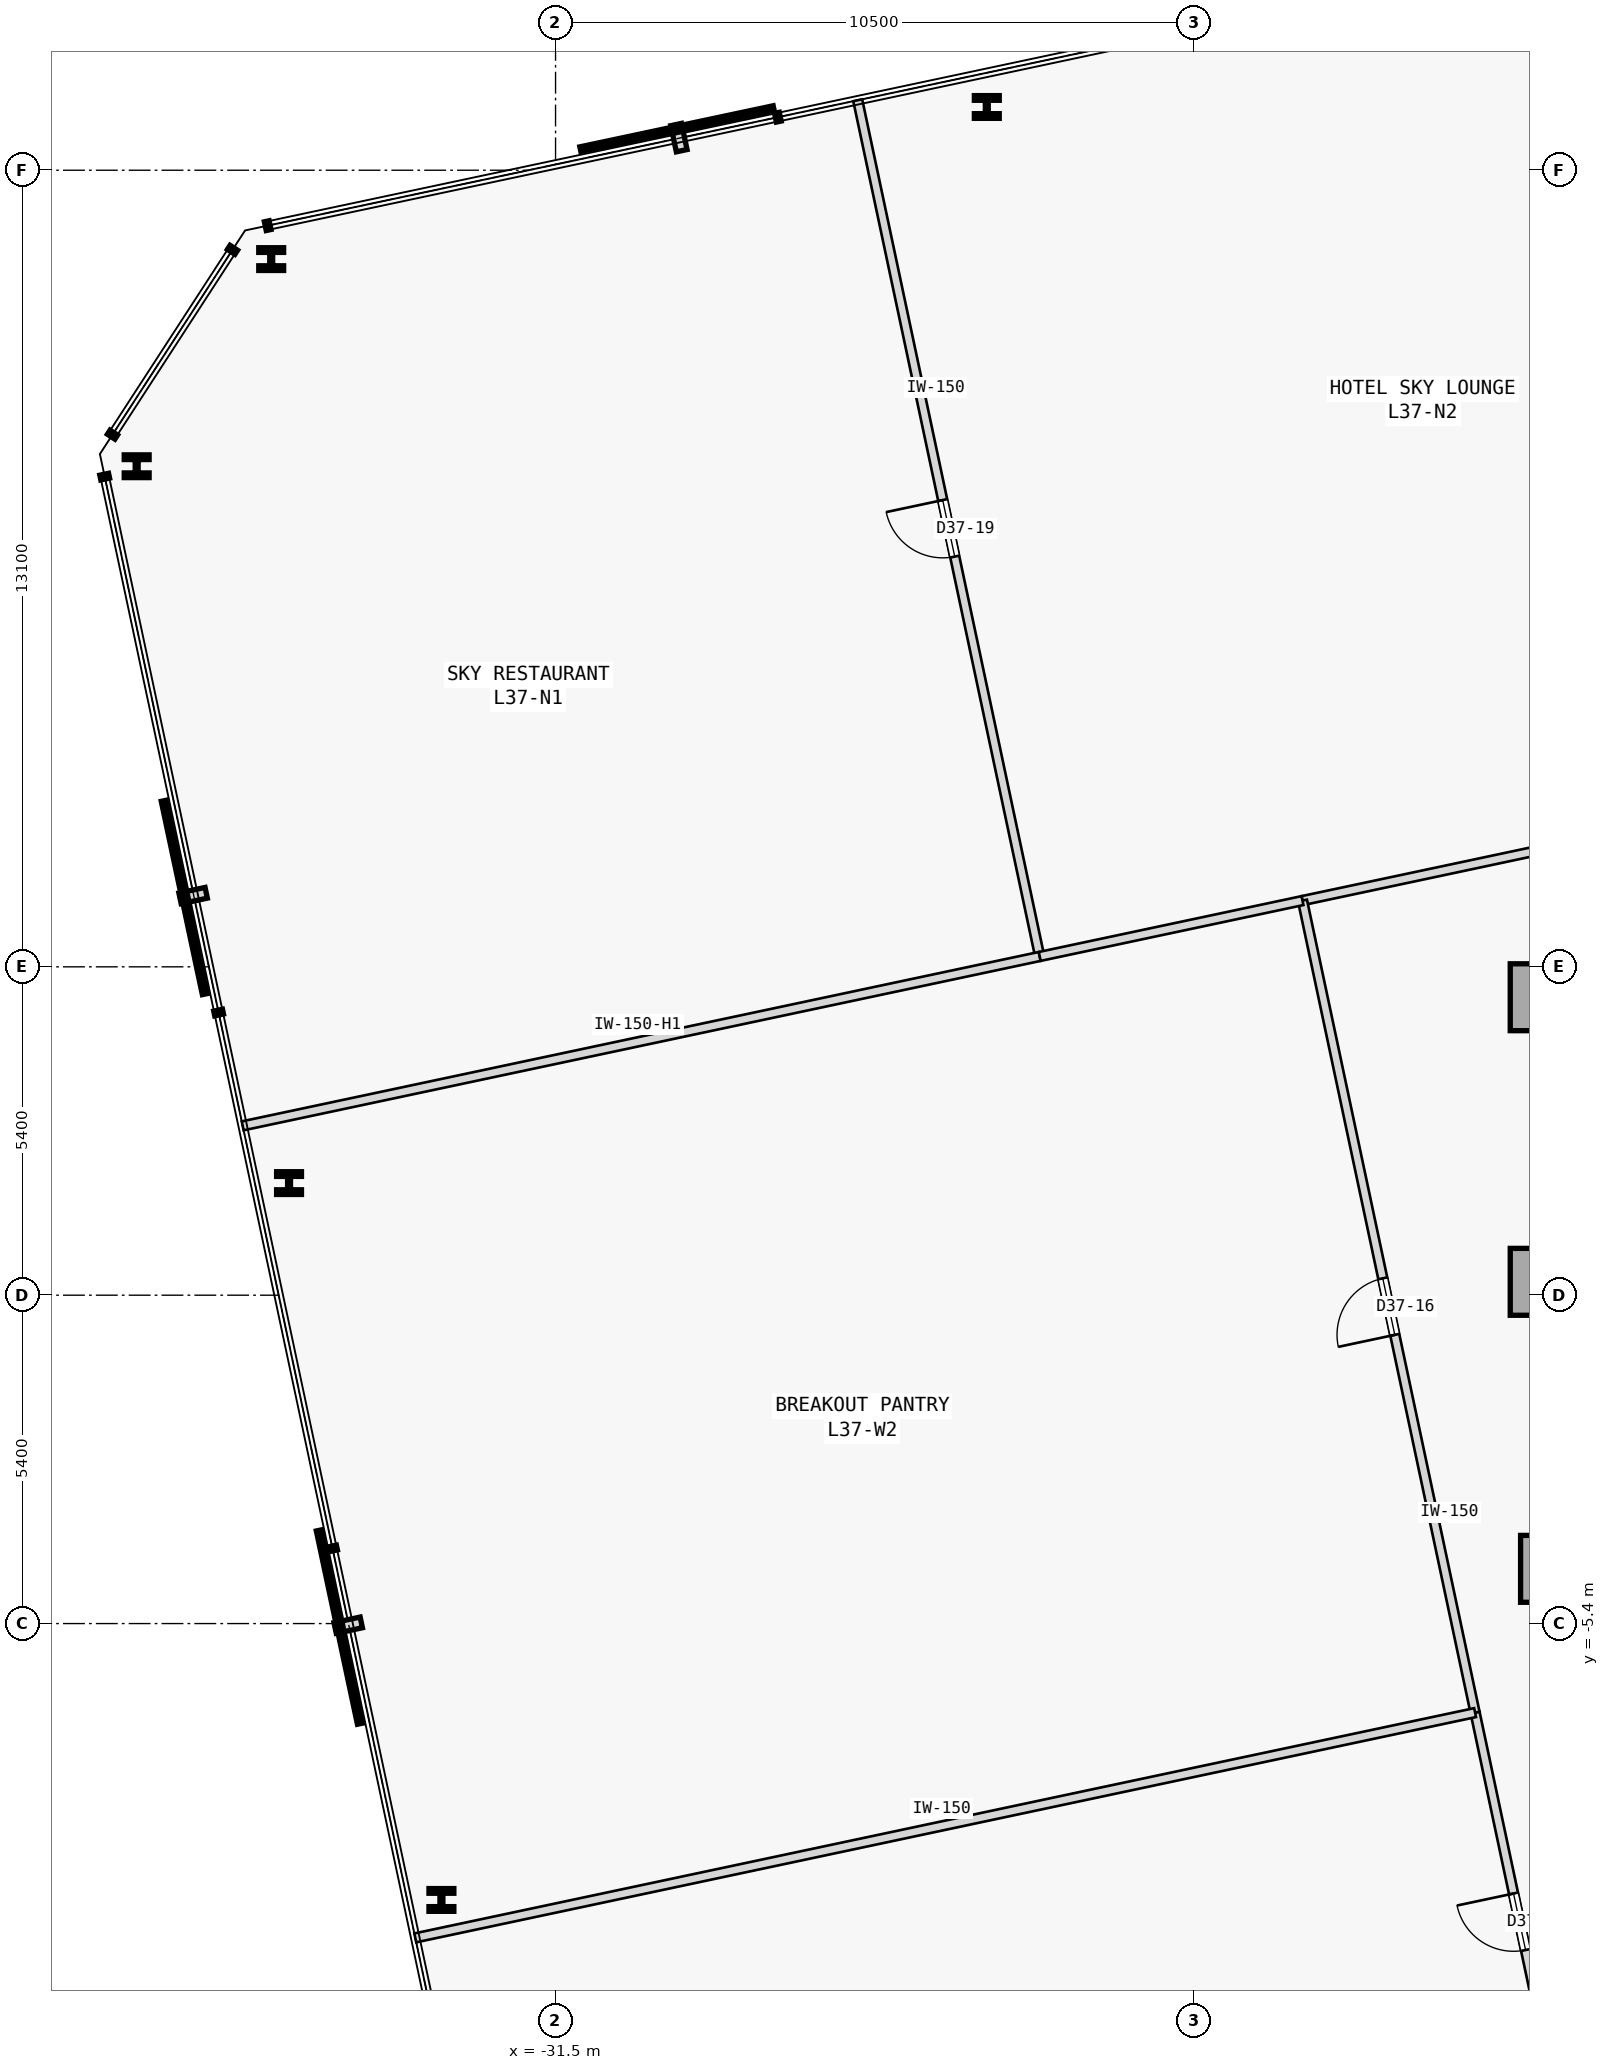
"""IFC4 building model, lengths in metres.
Left out: names, types, materials, properties, quantities, classifications, styles, units other than length and angle.
Written with IfcOpenShell. Run it as: python <this file> out.ifc"""

import sys

from ifc_helpers import new_model, si_unit, direction, frame, frame_2d, origin, origin_2d, place, context, subcontext, project, spatial, rectangle, i_section, extrude, element, fill, save


model = new_model("IFC4")
c1 = context("Model", 3, precision=1e-05, world=origin(), true_north=direction((0.0, 1.0)))
c2 = subcontext(c1, "Body", "Model", "MODEL_VIEW")
j1 = project(units=[si_unit("LENGTHUNIT", "METRE"), si_unit("PLANEANGLEUNIT", "RADIAN")], contexts=[c1])
p1 = place(None, origin())
s1 = spatial("IfcSite", under=j1, at=p1, CompositionType="ELEMENT")
p2 = place(p1, origin())
s2 = spatial("IfcBuilding", under=s1, at=p2, CompositionType="ELEMENT")
p3 = place(p2, frame((0.0, 0.0, 147.3)))
s3 = spatial("IfcBuildingStorey", under=s2, at=p3, CompositionType="ELEMENT", Elevation=147.3)
for number, where, z_axis, x_axis in (
    (1, (-15.25, 4.9, 0.0), (0.0, 0.0, 1.0), (1.0, 0.0, 0.0)),
    (2, (-15.25, 0.22, 0.0), (0.0, 0.0, 1.0), (1.0, 0.0, 0.0)),
    (3, (-15.08, -4.5, 0.0), (0.0, 0.0, 1.0), (1.0, 0.0, 0.0)),
):
    element("IfcColumn", number, at=place(p3, frame(where, z_axis=z_axis, x_axis=x_axis)), inside=s3, PredefinedType="COLUMN", context=c2, shape_type="SweptSolid", body=[
        extrude(rectangle(XDim=1.1, YDim=1.1, at=origin_2d()), origin(), (0.0, 0.0, 1.0), 4.1),
    ])
for number, where, z_axis, x_axis in (
    (4, (-24.408, 19.54, 0.0), (0.0, 0.0, 1.0), (1.0, 0.0, 0.0)),
    (5, (-36.176, 17.039, 0.0), (0.0, 0.0, 1.0), (1.0, 0.0, 0.0)),
    (6, (-38.389, 13.632, 0.0), (0.0, 0.0, 1.0), (1.0, 0.0, 0.0)),
    (7, (-35.883, 1.844, 0.0), (0.0, 0.0, 1.0), (1.0, 0.0, 0.0)),
    (8, (-33.377, -9.945, 0.0), (0.0, 0.0, 1.0), (1.0, 0.0, 0.0)),
):
    element("IfcColumn", number, at=place(p3, frame(where, z_axis=z_axis, x_axis=x_axis)), inside=s3, PredefinedType="COLUMN", context=c2, shape_type="SweptSolid", body=[
        extrude(i_section(OverallWidth=0.409, OverallDepth=0.374, WebThickness=0.048, FlangeThickness=0.077, FilletRadius=0.015, at=origin_2d()), origin(), (0.0, 0.0, 1.0), 4.1),
    ])
p4 = place(p3, frame((-19.217, 6.489, 0.0), z_axis=(0.0, 0.0, 1.0), x_axis=(0.978147578989, 0.207911793121, 0.0)))
e9 = element("IfcWall", 9, at=p4, inside=s3, PredefinedType="PARTITIONING", context=c2, shape_type="SweptSolid", body=[
    extrude(rectangle(XDim=12.332, YDim=0.15, at=frame_2d((6.166, 0.0))), origin(), (0.0, 0.0, 1.0), 3.875),
])
p5 = place(p4, frame((5.691, 0.0, 0.0)))
e10 = element("IfcOpeningElement", 10, at=p5, cuts=e9, PredefinedType="OPENING", context=c2, shape_type="SweptSolid", body=[
    extrude(rectangle(XDim=0.95, YDim=2.15, at=frame_2d((0.475, 1.075))), frame((0.0, 0.085, 0.0), z_axis=(0.0, -1.0, 0.0), x_axis=(1.0, 0.0, 0.0)), (0.0, 0.0, 1.0), 0.17),
])
p6 = place(p3, frame((-14.916, -13.744, 0.0), z_axis=(0.0, 0.0, 1.0), x_axis=(-0.207904840851, 0.978149056714, 0.0)))
e11 = element("IfcWall", 11, at=p6, inside=s3, PredefinedType="PARTITIONING", context=c2, shape_type="SweptSolid", body=[
    extrude(rectangle(XDim=7.033, YDim=0.15, at=frame_2d((3.516, 0.0))), origin(), (0.0, 0.0, 1.0), 3.875),
])
p7 = place(p6, frame((3.042, 0.0, 0.0)))
e12 = element("IfcOpeningElement", 12, at=p7, cuts=e11, PredefinedType="OPENING", context=c2, shape_type="SweptSolid", body=[
    extrude(rectangle(XDim=0.95, YDim=2.15, at=frame_2d((0.475, 1.075))), frame((0.0, 0.085, 0.0), z_axis=(0.0, -1.0, 0.0), x_axis=(1.0, 0.0, 0.0)), (0.0, 0.0, 1.0), 0.17),
])
p8 = place(p3, frame((-16.378, -6.865, 0.0), z_axis=(0.0, 0.0, 1.0), x_axis=(-0.207908161816, 0.97814835084, 0.0)))
e13 = element("IfcWall", 13, at=p8, inside=s3, PredefinedType="PARTITIONING", context=c2, shape_type="SweptSolid", body=[
    extrude(rectangle(XDim=13.652, YDim=0.15, at=frame_2d((6.826, 0.0))), origin(), (0.0, 0.0, 1.0), 3.875),
])
p9 = place(p8, frame((6.351, 0.0, 0.0)))
e14 = element("IfcOpeningElement", 14, at=p9, cuts=e13, PredefinedType="OPENING", context=c2, shape_type="SweptSolid", body=[
    extrude(rectangle(XDim=0.95, YDim=2.15, at=frame_2d((0.475, 1.075))), frame((0.0, 0.085, 0.0), z_axis=(0.0, -1.0, 0.0), x_axis=(1.0, 0.0, 0.0)), (0.0, 0.0, 1.0), 0.17),
])
p10 = place(p3, frame((-23.538, 5.571, 0.0), z_axis=(0.0, 0.0, 1.0), x_axis=(-0.207915348705, 0.978146823219, 0.0)))
e15 = element("IfcWall", 15, at=p10, inside=s3, PredefinedType="PARTITIONING", context=c2, shape_type="SweptSolid", body=[
    extrude(rectangle(XDim=14.395, YDim=0.15, at=frame_2d((7.197, 0.0))), origin(), (0.0, 0.0, 1.0), 3.875),
])
p11 = place(p10, frame((6.722, 0.0, 0.0)))
e16 = element("IfcOpeningElement", 16, at=p11, cuts=e15, PredefinedType="OPENING", context=c2, shape_type="SweptSolid", body=[
    extrude(rectangle(XDim=0.95, YDim=2.15, at=frame_2d((0.475, 1.075))), frame((0.0, 0.085, 0.0), z_axis=(0.0, -1.0, 0.0), x_axis=(1.0, 0.0, 0.0)), (0.0, 0.0, 1.0), 0.17),
])
p12 = place(p3, frame((-36.645, 2.785, 0.0), z_axis=(0.0, 0.0, 1.0), x_axis=(0.978145837467, 0.207919986164, 0.0)))
e17 = element("IfcWall", 17, at=p12, inside=s3, PredefinedType="PARTITIONING", context=c2, shape_type="SweptSolid", body=[
    extrude(rectangle(XDim=13.4, YDim=0.15, at=frame_2d((6.7, 0.0))), origin(), (0.0, 0.0, 1.0), 3.425),
])
p13 = place(p3, frame((-23.538, 5.571, 0.0), z_axis=(0.0, 0.0, 1.0), x_axis=(0.978152811504, 0.20788717456, 0.0)))
e18 = element("IfcWall", 18, at=p13, inside=s3, PredefinedType="PARTITIONING", context=c2, shape_type="SweptSolid", body=[
    extrude(rectangle(XDim=4.418, YDim=0.15, at=frame_2d((2.209, 0.0))), origin(), (0.0, 0.0, 1.0), 3.875),
])
p14 = place(p3, frame((-33.807, -10.569, 0.0), z_axis=(0.0, 0.0, 1.0), x_axis=(0.9781469745, 0.207914636994, 0.0)))
e19 = element("IfcWall", 19, at=p14, inside=s3, PredefinedType="PARTITIONING", context=c2, shape_type="SweptSolid", body=[
    extrude(rectangle(XDim=17.818, YDim=0.15, at=frame_2d((8.909, 0.0))), origin(), (0.0, 0.0, 1.0), 3.875),
])
p15 = place(p7, origin())
e20 = element("IfcDoor", 20, at=p15, inside=s3, OperationType="SINGLE_SWING_RIGHT", PredefinedType="DOOR", context=c2, shape_type="SweptSolid", body=[
    extrude(rectangle(XDim=0.95, YDim=2.15, at=frame_2d((0.475, 1.075))), frame((0.0, 0.025, 0.0), z_axis=(0.0, -1.0, 0.0), x_axis=(1.0, 0.0, 0.0)), (0.0, 0.0, 1.0), 0.05),
])
fill(e12, e20)
p16 = place(p9, origin())
e21 = element("IfcDoor", 21, at=p16, inside=s3, OperationType="SINGLE_SWING_LEFT", PredefinedType="DOOR", context=c2, shape_type="SweptSolid", body=[
    extrude(rectangle(XDim=0.95, YDim=2.15, at=frame_2d((0.475, 1.075))), frame((0.0, 0.025, 0.0), z_axis=(0.0, -1.0, 0.0), x_axis=(1.0, 0.0, 0.0)), (0.0, 0.0, 1.0), 0.05),
])
fill(e14, e21)
p17 = place(p11, origin())
e22 = element("IfcDoor", 22, at=p17, inside=s3, OperationType="SINGLE_SWING_RIGHT", PredefinedType="DOOR", context=c2, shape_type="SweptSolid", body=[
    extrude(rectangle(XDim=0.95, YDim=2.15, at=frame_2d((0.475, 1.075))), frame((0.0, 0.025, 0.0), z_axis=(0.0, -1.0, 0.0), x_axis=(1.0, 0.0, 0.0)), (0.0, 0.0, 1.0), 0.05),
])
fill(e16, e22)
save(model, sys.argv[1])
